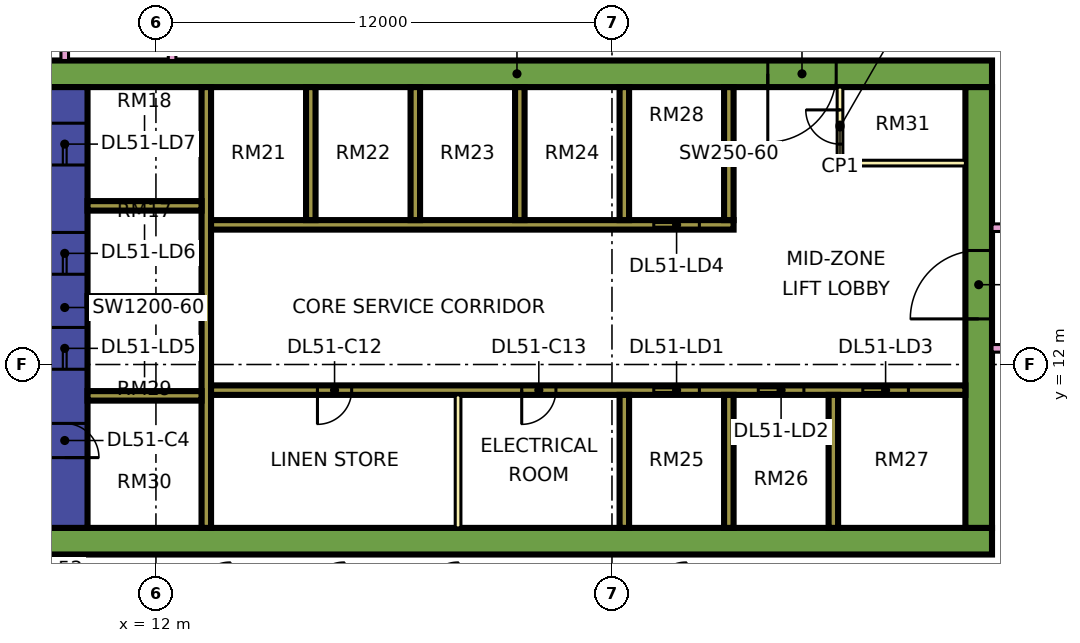
"""IFC4 building model, lengths in metres.
Left out: names, types, materials, properties, quantities, classifications, styles, units other than length and angle.
Written with IfcOpenShell. Run it as: python <this file> out.ifc"""

import sys

from ifc_helpers import new_model, si_unit, direction, frame, frame_2d, origin, place, context, subcontext, project, spatial, rectangle, extrude, element, fill, save


model = new_model("IFC4")
c1 = context("Model", 3, precision=1e-05, world=origin(), true_north=direction((0.0, 1.0)))
c2 = subcontext(c1, "Body", "Model", "MODEL_VIEW")
j1 = project(units=[si_unit("LENGTHUNIT", "METRE"), si_unit("PLANEANGLEUNIT", "RADIAN")], contexts=[c1])
p1 = place(None, origin())
s1 = spatial("IfcSite", under=j1, at=p1, CompositionType="ELEMENT")
p2 = place(p1, origin())
s2 = spatial("IfcBuilding", under=s1, at=p2, CompositionType="ELEMENT")
p3 = place(p2, frame((0.0, 0.0, 219.15)))
s3 = spatial("IfcBuildingStorey", under=s2, at=p3, CompositionType="ELEMENT", Elevation=219.15)
p4 = place(p3, frame((9.0, 7.35, 0.0), z_axis=(0.0, 0.0, 1.0), x_axis=(1.0, 0.0, 0.0)))
e1 = element("IfcWall", 1, at=p4, inside=s3, PredefinedType="SHEAR", context=c2, shape_type="SweptSolid", body=[
    extrude(rectangle(XDim=25.0, YDim=0.7, at=frame_2d((12.5, 0.0))), origin(), (0.0, 0.0, 1.0), 3.75),
])
p5 = place(p3, frame((9.0, 19.65, 0.0), z_axis=(0.0, 0.0, 1.0), x_axis=(1.0, 0.0, 0.0)))
e2 = element("IfcWall", 2, at=p5, inside=s3, PredefinedType="SHEAR", context=c2, shape_type="SweptSolid", body=[
    extrude(rectangle(XDim=25.0, YDim=0.7, at=frame_2d((12.5, 0.0))), origin(), (0.0, 0.0, 1.0), 3.75),
])
p6 = place(p5, frame((19.1, 0.0, 0.0)))
e3 = element("IfcOpeningElement", 3, at=p6, cuts=e2, PredefinedType="OPENING", context=c2, shape_type="SweptSolid", body=[
    extrude(rectangle(XDim=1.8, YDim=2.4, at=frame_2d((0.9, 1.2))), frame((0.0, 0.36, 0.0), z_axis=(0.0, -1.0, 0.0), x_axis=(1.0, 0.0, 0.0)), (0.0, 0.0, 1.0), 0.72),
])
p7 = place(p3, frame((9.6, 7.7, 0.0), z_axis=(0.0, 0.0, 1.0), x_axis=(0.0, 1.0, 0.0)))
e4 = element("IfcWall", 4, at=p7, inside=s3, PredefinedType="SHEAR", context=c2, shape_type="SweptSolid", body=[
    extrude(rectangle(XDim=11.6, YDim=1.2, at=frame_2d((5.8, 0.0))), origin(), (0.0, 0.0, 1.0), 3.75),
])
p8 = place(p7, frame((4.175, 0.0, 0.0)))
e5 = element("IfcOpeningElement", 5, at=p8, cuts=e4, PredefinedType="OPENING", context=c2, shape_type="SweptSolid", body=[
    extrude(rectangle(XDim=1.1, YDim=2.2, at=frame_2d((0.55, 1.1))), frame((0.0, 0.61, 0.0), z_axis=(0.0, -1.0, 0.0), x_axis=(1.0, 0.0, 0.0)), (0.0, 0.0, 1.0), 1.22),
])
p9 = place(p7, frame((6.675, 0.0, 0.0)))
e6 = element("IfcOpeningElement", 6, at=p9, cuts=e4, PredefinedType="OPENING", context=c2, shape_type="SweptSolid", body=[
    extrude(rectangle(XDim=1.1, YDim=2.2, at=frame_2d((0.55, 1.1))), frame((0.0, 0.61, 0.0), z_axis=(0.0, -1.0, 0.0), x_axis=(1.0, 0.0, 0.0)), (0.0, 0.0, 1.0), 1.22),
])
p10 = place(p7, frame((9.55, 0.0, 0.0)))
e7 = element("IfcOpeningElement", 7, at=p10, cuts=e4, PredefinedType="OPENING", context=c2, shape_type="SweptSolid", body=[
    extrude(rectangle(XDim=1.1, YDim=2.2, at=frame_2d((0.55, 1.1))), frame((0.0, 0.61, 0.0), z_axis=(0.0, -1.0, 0.0), x_axis=(1.0, 0.0, 0.0)), (0.0, 0.0, 1.0), 1.22),
])
p11 = place(p7, frame((1.85, 0.0, 0.0)))
e8 = element("IfcOpeningElement", 8, at=p11, cuts=e4, PredefinedType="OPENING", context=c2, shape_type="SweptSolid", body=[
    extrude(rectangle(XDim=0.9, YDim=2.1, at=frame_2d((0.45, 1.05))), frame((0.0, 0.61, 0.0), z_axis=(0.0, -1.0, 0.0), x_axis=(1.0, 0.0, 0.0)), (0.0, 0.0, 1.0), 1.22),
])
p12 = place(p3, frame((33.65, 7.7, 0.0), z_axis=(0.0, 0.0, 1.0), x_axis=(0.0, 1.0, 0.0)))
e9 = element("IfcWall", 9, at=p12, inside=s3, PredefinedType="SHEAR", context=c2, shape_type="SweptSolid", body=[
    extrude(rectangle(XDim=11.6, YDim=0.7, at=frame_2d((5.8, 0.0))), origin(), (0.0, 0.0, 1.0), 3.75),
])
p13 = place(p12, frame((5.5, 0.0, 0.0)))
e10 = element("IfcOpeningElement", 10, at=p13, cuts=e9, PredefinedType="OPENING", context=c2, shape_type="SweptSolid", body=[
    extrude(rectangle(XDim=1.8, YDim=2.4, at=frame_2d((0.9, 1.2))), frame((0.0, 0.36, 0.0), z_axis=(0.0, -1.0, 0.0), x_axis=(1.0, 0.0, 0.0)), (0.0, 0.0, 1.0), 0.72),
])
p14 = place(p3, frame((13.325, 7.7, 0.0), z_axis=(0.0, 0.0, 1.0), x_axis=(0.0, 1.0, 0.0)))
e11 = element("IfcWall", 11, at=p14, inside=s3, PredefinedType="SHEAR", context=c2, shape_type="SweptSolid", body=[
    extrude(rectangle(XDim=11.6, YDim=0.25, at=frame_2d((5.8, 0.0))), origin(), (0.0, 0.0, 1.0), 3.75),
])
p15 = place(p3, frame((13.45, 11.325, 0.0), z_axis=(0.0, 0.0, 1.0), x_axis=(1.0, 0.0, 0.0)))
e12 = element("IfcWall", 12, at=p15, inside=s3, PredefinedType="SHEAR", context=c2, shape_type="SweptSolid", body=[
    extrude(rectangle(XDim=19.85, YDim=0.25, at=frame_2d((9.925, 0.0))), origin(), (0.0, 0.0, 1.0), 3.75),
])
p16 = place(p15, frame((11.65, 0.0, 0.0)))
e13 = element("IfcOpeningElement", 13, at=p16, cuts=e12, PredefinedType="OPENING", context=c2, shape_type="SweptSolid", body=[
    extrude(rectangle(XDim=1.2, YDim=2.2, at=frame_2d((0.6, 1.1))), frame((0.0, 0.135, 0.0), z_axis=(0.0, -1.0, 0.0), x_axis=(1.0, 0.0, 0.0)), (0.0, 0.0, 1.0), 0.27),
])
p17 = place(p15, frame((14.4, 0.0, 0.0)))
e14 = element("IfcOpeningElement", 14, at=p17, cuts=e12, PredefinedType="OPENING", context=c2, shape_type="SweptSolid", body=[
    extrude(rectangle(XDim=1.2, YDim=2.2, at=frame_2d((0.6, 1.1))), frame((0.0, 0.135, 0.0), z_axis=(0.0, -1.0, 0.0), x_axis=(1.0, 0.0, 0.0)), (0.0, 0.0, 1.0), 0.27),
])
p18 = place(p15, frame((17.15, 0.0, 0.0)))
e15 = element("IfcOpeningElement", 15, at=p18, cuts=e12, PredefinedType="OPENING", context=c2, shape_type="SweptSolid", body=[
    extrude(rectangle(XDim=1.2, YDim=2.2, at=frame_2d((0.6, 1.1))), frame((0.0, 0.135, 0.0), z_axis=(0.0, -1.0, 0.0), x_axis=(1.0, 0.0, 0.0)), (0.0, 0.0, 1.0), 0.27),
])
p19 = place(p15, frame((2.8, 0.0, 0.0)))
e16 = element("IfcOpeningElement", 16, at=p19, cuts=e12, PredefinedType="OPENING", context=c2, shape_type="SweptSolid", body=[
    extrude(rectangle(XDim=0.9, YDim=2.1, at=frame_2d((0.45, 1.05))), frame((0.0, 0.135, 0.0), z_axis=(0.0, -1.0, 0.0), x_axis=(1.0, 0.0, 0.0)), (0.0, 0.0, 1.0), 0.27),
])
p20 = place(p15, frame((8.175, 0.0, 0.0)))
e17 = element("IfcOpeningElement", 17, at=p20, cuts=e12, PredefinedType="OPENING", context=c2, shape_type="SweptSolid", body=[
    extrude(rectangle(XDim=0.9, YDim=2.1, at=frame_2d((0.45, 1.05))), frame((0.0, 0.135, 0.0), z_axis=(0.0, -1.0, 0.0), x_axis=(1.0, 0.0, 0.0)), (0.0, 0.0, 1.0), 0.27),
])
p21 = place(p3, frame((13.45, 15.675, 0.0), z_axis=(0.0, 0.0, 1.0), x_axis=(1.0, 0.0, 0.0)))
e18 = element("IfcWall", 18, at=p21, inside=s3, PredefinedType="SHEAR", context=c2, shape_type="SweptSolid", body=[
    extrude(rectangle(XDim=13.75, YDim=0.25, at=frame_2d((6.875, 0.0))), origin(), (0.0, 0.0, 1.0), 3.75),
])
p22 = place(p21, frame((11.65, 0.0, 0.0)))
e19 = element("IfcOpeningElement", 19, at=p22, cuts=e18, PredefinedType="OPENING", context=c2, shape_type="SweptSolid", body=[
    extrude(rectangle(XDim=1.2, YDim=2.2, at=frame_2d((0.6, 1.1))), frame((0.0, 0.135, 0.0), z_axis=(0.0, -1.0, 0.0), x_axis=(1.0, 0.0, 0.0)), (0.0, 0.0, 1.0), 0.27),
])
for number, where, z_axis, x_axis in (
    (20, (10.2, 11.175, 0.0), (0.0, 0.0, 1.0), (1.0, 0.0, 0.0)),
    (21, (10.2, 13.675, 0.0), (0.0, 0.0, 1.0), (1.0, 0.0, 0.0)),
    (22, (10.2, 16.175, 0.0), (0.0, 0.0, 1.0), (1.0, 0.0, 0.0)),
):
    element("IfcWall", number, at=place(p3, frame(where, z_axis=z_axis, x_axis=x_axis)), inside=s3, PredefinedType="SHEAR", context=c2, shape_type="SweptSolid", body=[
        extrude(rectangle(XDim=3.0, YDim=0.25, at=frame_2d((1.5, 0.0))), origin(), (0.0, 0.0, 1.0), 3.75),
    ])
for number, where, z_axis, x_axis in (
    (23, (24.325, 7.7, 0.0), (0.0, 0.0, 1.0), (0.0, 1.0, 0.0)),
    (24, (27.075, 7.7, 0.0), (0.0, 0.0, 1.0), (0.0, 1.0, 0.0)),
    (25, (29.825, 7.7, 0.0), (0.0, 0.0, 1.0), (0.0, 1.0, 0.0)),
    (26, (16.075, 15.8, 0.0), (0.0, 0.0, 1.0), (0.0, 1.0, 0.0)),
    (27, (18.825, 15.8, 0.0), (0.0, 0.0, 1.0), (0.0, 1.0, 0.0)),
    (28, (21.575, 15.8, 0.0), (0.0, 0.0, 1.0), (0.0, 1.0, 0.0)),
    (29, (24.325, 15.8, 0.0), (0.0, 0.0, 1.0), (0.0, 1.0, 0.0)),
    (30, (27.075, 15.8, 0.0), (0.0, 0.0, 1.0), (0.0, 1.0, 0.0)),
):
    element("IfcWall", number, at=place(p3, frame(where, z_axis=z_axis, x_axis=x_axis)), inside=s3, PredefinedType="SHEAR", context=c2, shape_type="SweptSolid", body=[
        extrude(rectangle(XDim=3.5, YDim=0.25, at=frame_2d((1.75, 0.0))), origin(), (0.0, 0.0, 1.0), 3.75),
    ])
p23 = place(p3, frame((-1.447, 12.553, 0.0), z_axis=(0.0, 0.0, 1.0), x_axis=(0.707106781187, -0.707106781187, 0.0)))
e31 = element("IfcWall", 31, at=p23, inside=s3, PredefinedType="SOLIDWALL", context=c2, shape_type="SweptSolid", body=[
    extrude(rectangle(XDim=19.799, YDim=0.15, at=frame_2d((9.899, 0.0))), origin(), (0.0, 0.0, 1.0), 3.35),
])
p24 = place(p23, frame((2.212, 0.0, 0.45)))
e32 = element("IfcOpeningElement", 32, at=p24, cuts=e31, PredefinedType="OPENING", context=c2, shape_type="SweptSolid", body=[
    extrude(rectangle(XDim=3.0, YDim=2.4, at=frame_2d((1.5, 1.2))), frame((0.0, 0.085, 0.0), z_axis=(0.0, -1.0, 0.0), x_axis=(1.0, 0.0, 0.0)), (0.0, 0.0, 1.0), 0.17),
])
p25 = place(p23, frame((10.216, 0.0, 0.45)))
e33 = element("IfcOpeningElement", 33, at=p25, cuts=e31, PredefinedType="OPENING", context=c2, shape_type="SweptSolid", body=[
    extrude(rectangle(XDim=3.0, YDim=2.4, at=frame_2d((1.5, 1.2))), frame((0.0, 0.085, 0.0), z_axis=(0.0, -1.0, 0.0), x_axis=(1.0, 0.0, 0.0)), (0.0, 0.0, 1.0), 0.17),
])
p26 = place(p3, frame((19.95, 7.7, 0.0), z_axis=(0.0, 0.0, 1.0), x_axis=(0.0, 1.0, 0.0)))
e34 = element("IfcWall", 34, at=p26, inside=s3, PredefinedType="PARTITIONING", context=c2, shape_type="SweptSolid", body=[
    extrude(rectangle(XDim=3.5, YDim=0.15, at=frame_2d((1.75, 0.0))), origin(), (0.0, 0.0, 1.0), 3.35),
])
p27 = place(p3, frame((30.0, 17.3, 0.0), z_axis=(0.0, 0.0, 1.0), x_axis=(0.0, 1.0, 0.0)))
e35 = element("IfcWall", 35, at=p27, inside=s3, PredefinedType="PARTITIONING", context=c2, shape_type="SweptSolid", body=[
    extrude(rectangle(XDim=2.0, YDim=0.15, at=frame_2d((1.0, 0.0))), origin(), (0.0, 0.0, 1.0), 3.35),
])
p28 = place(p27, frame((0.5, 0.0, 0.0)))
e36 = element("IfcOpeningElement", 36, at=p28, cuts=e35, PredefinedType="OPENING", context=c2, shape_type="SweptSolid", body=[
    extrude(rectangle(XDim=0.9, YDim=2.1, at=frame_2d((0.45, 1.05))), frame((0.0, 0.085, 0.0), z_axis=(0.0, -1.0, 0.0), x_axis=(1.0, 0.0, 0.0)), (0.0, 0.0, 1.0), 0.17),
])
p29 = place(p3, frame((30.0, 17.3, 0.0), z_axis=(0.0, 0.0, 1.0), x_axis=(1.0, 0.0, 0.0)))
e37 = element("IfcWall", 37, at=p29, inside=s3, PredefinedType="PARTITIONING", context=c2, shape_type="SweptSolid", body=[
    extrude(rectangle(XDim=3.3, YDim=0.15, at=frame_2d((1.65, 0.0))), origin(), (0.0, 0.0, 1.0), 3.35),
])
p30 = place(p3, frame((9.6, 20.0, 0.0), z_axis=(0.0, 0.0, 1.0), x_axis=(0.0, 1.0, 0.0)))
e38 = element("IfcWall", 38, at=p30, inside=s3, PredefinedType="PARTITIONING", context=c2, shape_type="SweptSolid", body=[
    extrude(rectangle(XDim=42.926, YDim=0.2, at=frame_2d((21.463, 0.0))), origin(), (0.0, 0.0, 1.0), 3.35),
])
p31 = place(p30, frame((17.1, 0.0, 0.0)))
e39 = element("IfcOpeningElement", 39, at=p31, cuts=e38, PredefinedType="OPENING", context=c2, shape_type="SweptSolid", body=[
    extrude(rectangle(XDim=1.0, YDim=2.1, at=frame_2d((0.5, 1.05))), frame((0.0, 0.11, 0.0), z_axis=(0.0, -1.0, 0.0), x_axis=(1.0, 0.0, 0.0)), (0.0, 0.0, 1.0), 0.22),
])
p32 = place(p30, frame((32.1, 0.0, 0.0)))
e40 = element("IfcOpeningElement", 40, at=p32, cuts=e38, PredefinedType="OPENING", context=c2, shape_type="SweptSolid", body=[
    extrude(rectangle(XDim=1.0, YDim=2.1, at=frame_2d((0.5, 1.05))), frame((0.0, 0.11, 0.0), z_axis=(0.0, -1.0, 0.0), x_axis=(1.0, 0.0, 0.0)), (0.0, 0.0, 1.0), 0.22),
])
p33 = place(p30, frame((0.6, 0.0, 0.0)))
e41 = element("IfcOpeningElement", 41, at=p33, cuts=e38, PredefinedType="OPENING", context=c2, shape_type="SweptSolid", body=[
    extrude(rectangle(XDim=1.2, YDim=2.1, at=frame_2d((0.6, 1.05))), frame((0.0, 0.11, 0.0), z_axis=(0.0, -1.0, 0.0), x_axis=(1.0, 0.0, 0.0)), (0.0, 0.0, 1.0), 0.22),
])
p34 = place(p30, frame((14.1, 0.0, 0.0)))
e42 = element("IfcOpeningElement", 42, at=p34, cuts=e38, PredefinedType="OPENING", context=c2, shape_type="SweptSolid", body=[
    extrude(rectangle(XDim=1.0, YDim=2.1, at=frame_2d((0.5, 1.05))), frame((0.0, 0.11, 0.0), z_axis=(0.0, -1.0, 0.0), x_axis=(1.0, 0.0, 0.0)), (0.0, 0.0, 1.0), 0.22),
])
p35 = place(p3, frame((12.425, 20.0, 0.0), z_axis=(0.0, 0.0, 1.0), x_axis=(0.0, 1.0, 0.0)))
e43 = element("IfcWall", 43, at=p35, inside=s3, PredefinedType="PARTITIONING", context=c2, shape_type="SweptSolid", body=[
    extrude(rectangle(XDim=43.0, YDim=0.2, at=frame_2d((21.5, 0.0))), origin(), (0.0, 0.0, 1.0), 3.35),
])
p36 = place(p35, frame((7.15, 0.0, 0.0)))
e44 = element("IfcOpeningElement", 44, at=p36, cuts=e43, PredefinedType="OPENING", context=c2, shape_type="SweptSolid", body=[
    extrude(rectangle(XDim=1.6, YDim=2.1, at=frame_2d((0.8, 1.05))), frame((0.0, 0.11, 0.0), z_axis=(0.0, -1.0, 0.0), x_axis=(1.0, 0.0, 0.0)), (0.0, 0.0, 1.0), 0.22),
])
p37 = place(p35, frame((13.5, 0.0, 0.0)))
e45 = element("IfcOpeningElement", 45, at=p37, cuts=e43, PredefinedType="OPENING", context=c2, shape_type="SweptSolid", body=[
    extrude(rectangle(XDim=1.0, YDim=2.1, at=frame_2d((0.5, 1.05))), frame((0.0, 0.11, 0.0), z_axis=(0.0, -1.0, 0.0), x_axis=(1.0, 0.0, 0.0)), (0.0, 0.0, 1.0), 0.22),
])
p38 = place(p35, frame((22.9, 0.0, 0.0)))
e46 = element("IfcOpeningElement", 46, at=p38, cuts=e43, PredefinedType="OPENING", context=c2, shape_type="SweptSolid", body=[
    extrude(rectangle(XDim=1.0, YDim=2.1, at=frame_2d((0.5, 1.05))), frame((0.0, 0.11, 0.0), z_axis=(0.0, -1.0, 0.0), x_axis=(1.0, 0.0, 0.0)), (0.0, 0.0, 1.0), 0.22),
])
p39 = place(p35, frame((35.35, 0.0, 0.0)))
e47 = element("IfcOpeningElement", 47, at=p39, cuts=e43, PredefinedType="OPENING", context=c2, shape_type="SweptSolid", body=[
    extrude(rectangle(XDim=1.0, YDim=2.1, at=frame_2d((0.5, 1.05))), frame((0.0, 0.11, 0.0), z_axis=(0.0, -1.0, 0.0), x_axis=(1.0, 0.0, 0.0)), (0.0, 0.0, 1.0), 0.22),
])
p40 = place(p35, frame((1.15, 0.0, 0.0)))
e48 = element("IfcOpeningElement", 48, at=p40, cuts=e43, PredefinedType="OPENING", context=c2, shape_type="SweptSolid", body=[
    extrude(rectangle(XDim=1.8, YDim=2.1, at=frame_2d((0.9, 1.05))), frame((0.0, 0.11, 0.0), z_axis=(0.0, -1.0, 0.0), x_axis=(1.0, 0.0, 0.0)), (0.0, 0.0, 1.0), 0.22),
])
p41 = place(p35, frame((28.6, 0.0, 0.0)))
e49 = element("IfcOpeningElement", 49, at=p41, cuts=e43, PredefinedType="OPENING", context=c2, shape_type="SweptSolid", body=[
    extrude(rectangle(XDim=1.8, YDim=2.1, at=frame_2d((0.9, 1.05))), frame((0.0, 0.11, 0.0), z_axis=(0.0, -1.0, 0.0), x_axis=(1.0, 0.0, 0.0)), (0.0, 0.0, 1.0), 0.22),
])
p42 = place(p3, frame((34.0, 12.425, 0.0), z_axis=(0.0, 0.0, 1.0), x_axis=(1.0, 0.0, 0.0)))
e50 = element("IfcWall", 50, at=p42, inside=s3, PredefinedType="PARTITIONING", context=c2, shape_type="SweptSolid", body=[
    extrude(rectangle(XDim=2.426, YDim=0.2, at=frame_2d((1.213, 0.0))), origin(), (0.0, 0.0, 1.0), 3.35),
])
p43 = place(p3, frame((34.0, 15.6, 0.0), z_axis=(0.0, 0.0, 1.0), x_axis=(1.0, 0.0, 0.0)))
e51 = element("IfcWall", 51, at=p43, inside=s3, PredefinedType="PARTITIONING", context=c2, shape_type="SweptSolid", body=[
    extrude(rectangle(XDim=10.35, YDim=0.2, at=frame_2d((5.175, 0.0))), origin(), (0.0, 0.0, 1.0), 3.35),
])
p44 = place(p43, frame((5.6, 0.0, 0.0)))
e52 = element("IfcOpeningElement", 52, at=p44, cuts=e51, PredefinedType="OPENING", context=c2, shape_type="SweptSolid", body=[
    extrude(rectangle(XDim=1.0, YDim=2.1, at=frame_2d((0.5, 1.05))), frame((0.0, 0.11, 0.0), z_axis=(0.0, -1.0, 0.0), x_axis=(1.0, 0.0, 0.0)), (0.0, 0.0, 1.0), 0.22),
])
p45 = place(p43, frame((0.45, 0.0, 0.0)))
e53 = element("IfcOpeningElement", 53, at=p45, cuts=e51, PredefinedType="OPENING", context=c2, shape_type="SweptSolid", body=[
    extrude(rectangle(XDim=1.2, YDim=2.1, at=frame_2d((0.6, 1.05))), frame((0.0, 0.11, 0.0), z_axis=(0.0, -1.0, 0.0), x_axis=(1.0, 0.0, 0.0)), (0.0, 0.0, 1.0), 0.22),
])
p46 = place(p16, origin())
e54 = element("IfcDoor", 54, at=p46, inside=s3, OperationType="DOUBLE_DOOR_SLIDING", PredefinedType="DOOR", context=c2, shape_type="SweptSolid", body=[
    extrude(rectangle(XDim=1.2, YDim=2.2, at=frame_2d((0.6, 1.1))), frame((0.0, 0.025, 0.0), z_axis=(0.0, -1.0, 0.0), x_axis=(1.0, 0.0, 0.0)), (0.0, 0.0, 1.0), 0.05),
])
fill(e13, e54)
p47 = place(p17, origin())
e55 = element("IfcDoor", 55, at=p47, inside=s3, OperationType="DOUBLE_DOOR_SLIDING", PredefinedType="DOOR", context=c2, shape_type="SweptSolid", body=[
    extrude(rectangle(XDim=1.2, YDim=2.2, at=frame_2d((0.6, 1.1))), frame((0.0, 0.025, 0.0), z_axis=(0.0, -1.0, 0.0), x_axis=(1.0, 0.0, 0.0)), (0.0, 0.0, 1.0), 0.05),
])
fill(e14, e55)
p48 = place(p18, origin())
e56 = element("IfcDoor", 56, at=p48, inside=s3, OperationType="DOUBLE_DOOR_SLIDING", PredefinedType="DOOR", context=c2, shape_type="SweptSolid", body=[
    extrude(rectangle(XDim=1.2, YDim=2.2, at=frame_2d((0.6, 1.1))), frame((0.0, 0.025, 0.0), z_axis=(0.0, -1.0, 0.0), x_axis=(1.0, 0.0, 0.0)), (0.0, 0.0, 1.0), 0.05),
])
fill(e15, e56)
p49 = place(p22, origin())
e57 = element("IfcDoor", 57, at=p49, inside=s3, OperationType="DOUBLE_DOOR_SLIDING", PredefinedType="DOOR", context=c2, shape_type="SweptSolid", body=[
    extrude(rectangle(XDim=1.2, YDim=2.2, at=frame_2d((0.6, 1.1))), frame((0.0, 0.025, 0.0), z_axis=(0.0, -1.0, 0.0), x_axis=(1.0, 0.0, 0.0)), (0.0, 0.0, 1.0), 0.05),
])
fill(e19, e57)
p50 = place(p8, origin())
e58 = element("IfcDoor", 58, at=p50, inside=s3, OperationType="DOUBLE_DOOR_SLIDING", PredefinedType="DOOR", context=c2, shape_type="SweptSolid", body=[
    extrude(rectangle(XDim=1.1, YDim=2.2, at=frame_2d((0.55, 1.1))), frame((0.0, 0.025, 0.0), z_axis=(0.0, -1.0, 0.0), x_axis=(1.0, 0.0, 0.0)), (0.0, 0.0, 1.0), 0.05),
])
fill(e5, e58)
p51 = place(p9, origin())
e59 = element("IfcDoor", 59, at=p51, inside=s3, OperationType="DOUBLE_DOOR_SLIDING", PredefinedType="DOOR", context=c2, shape_type="SweptSolid", body=[
    extrude(rectangle(XDim=1.1, YDim=2.2, at=frame_2d((0.55, 1.1))), frame((0.0, 0.025, 0.0), z_axis=(0.0, -1.0, 0.0), x_axis=(1.0, 0.0, 0.0)), (0.0, 0.0, 1.0), 0.05),
])
fill(e6, e59)
p52 = place(p10, origin())
e60 = element("IfcDoor", 60, at=p52, inside=s3, OperationType="DOUBLE_DOOR_SLIDING", PredefinedType="DOOR", context=c2, shape_type="SweptSolid", body=[
    extrude(rectangle(XDim=1.1, YDim=2.2, at=frame_2d((0.55, 1.1))), frame((0.0, 0.025, 0.0), z_axis=(0.0, -1.0, 0.0), x_axis=(1.0, 0.0, 0.0)), (0.0, 0.0, 1.0), 0.05),
])
fill(e7, e60)
p53 = place(p13, origin())
e61 = element("IfcDoor", 61, at=p53, inside=s3, OperationType="DOUBLE_DOOR_SINGLE_SWING", PredefinedType="DOOR", context=c2, shape_type="SweptSolid", body=[
    extrude(rectangle(XDim=1.8, YDim=2.4, at=frame_2d((0.9, 1.2))), frame((0.0, 0.025, 0.0), z_axis=(0.0, -1.0, 0.0), x_axis=(1.0, 0.0, 0.0)), (0.0, 0.0, 1.0), 0.05),
])
fill(e10, e61)
p54 = place(p6, frame((1.8, 0.0, 0.0), z_axis=(0.0, 0.0, 1.0), x_axis=(-1.0, 0.0, 0.0)))
e62 = element("IfcDoor", 62, at=p54, inside=s3, OperationType="DOUBLE_DOOR_SINGLE_SWING", PredefinedType="DOOR", context=c2, shape_type="SweptSolid", body=[
    extrude(rectangle(XDim=1.8, YDim=2.4, at=frame_2d((0.9, 1.2))), frame((0.0, 0.025, 0.0), z_axis=(0.0, -1.0, 0.0), x_axis=(1.0, 0.0, 0.0)), (0.0, 0.0, 1.0), 0.05),
])
fill(e3, e62)
p55 = place(p11, frame((0.9, 0.0, 0.0), z_axis=(0.0, 0.0, 1.0), x_axis=(-1.0, 0.0, 0.0)))
e63 = element("IfcDoor", 63, at=p55, inside=s3, OperationType="SINGLE_SWING_LEFT", PredefinedType="DOOR", context=c2, shape_type="SweptSolid", body=[
    extrude(rectangle(XDim=0.9, YDim=2.1, at=frame_2d((0.45, 1.05))), frame((0.0, 0.025, 0.0), z_axis=(0.0, -1.0, 0.0), x_axis=(1.0, 0.0, 0.0)), (0.0, 0.0, 1.0), 0.05),
])
fill(e8, e63)
p56 = place(p19, frame((0.9, 0.0, 0.0), z_axis=(0.0, 0.0, 1.0), x_axis=(-1.0, 0.0, 0.0)))
e64 = element("IfcDoor", 64, at=p56, inside=s3, OperationType="SINGLE_SWING_LEFT", PredefinedType="DOOR", context=c2, shape_type="SweptSolid", body=[
    extrude(rectangle(XDim=0.9, YDim=2.1, at=frame_2d((0.45, 1.05))), frame((0.0, 0.025, 0.0), z_axis=(0.0, -1.0, 0.0), x_axis=(1.0, 0.0, 0.0)), (0.0, 0.0, 1.0), 0.05),
])
fill(e16, e64)
p57 = place(p20, frame((0.9, 0.0, 0.0), z_axis=(0.0, 0.0, 1.0), x_axis=(-1.0, 0.0, 0.0)))
e65 = element("IfcDoor", 65, at=p57, inside=s3, OperationType="SINGLE_SWING_LEFT", PredefinedType="DOOR", context=c2, shape_type="SweptSolid", body=[
    extrude(rectangle(XDim=0.9, YDim=2.1, at=frame_2d((0.45, 1.05))), frame((0.0, 0.025, 0.0), z_axis=(0.0, -1.0, 0.0), x_axis=(1.0, 0.0, 0.0)), (0.0, 0.0, 1.0), 0.05),
])
fill(e17, e65)
p58 = place(p28, frame((0.9, 0.0, 0.0), z_axis=(0.0, 0.0, 1.0), x_axis=(-1.0, 0.0, 0.0)))
e66 = element("IfcDoor", 66, at=p58, inside=s3, OperationType="SINGLE_SWING_RIGHT", PredefinedType="DOOR", context=c2, shape_type="SweptSolid", body=[
    extrude(rectangle(XDim=0.9, YDim=2.1, at=frame_2d((0.45, 1.05))), frame((0.0, 0.025, 0.0), z_axis=(0.0, -1.0, 0.0), x_axis=(1.0, 0.0, 0.0)), (0.0, 0.0, 1.0), 0.05),
])
fill(e36, e66)
save(model, sys.argv[1])
